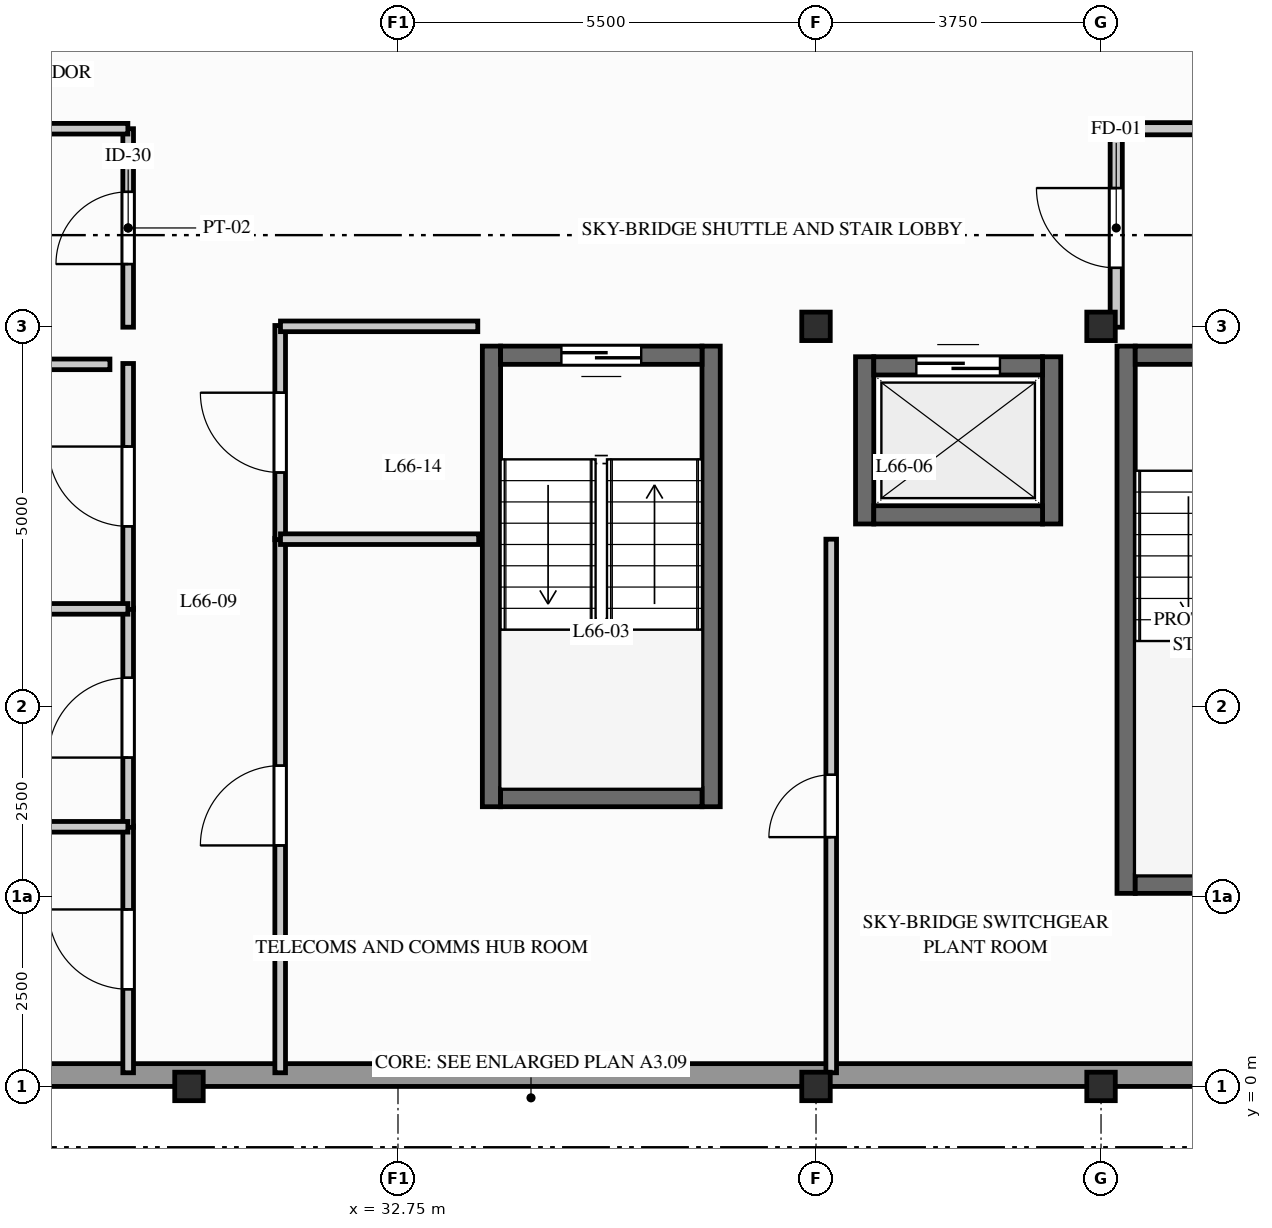
"""IFC4 building model, lengths in metres.
Left out: names, types, materials, properties, quantities, classifications, styles, units other than length and angle.
Written with IfcOpenShell. Run it as: python <this file> out.ifc"""

import sys

from ifc_helpers import new_model, si_unit, direction, frame, frame_2d, origin, origin_2d, place, context, subcontext, project, spatial, rectangle, i_section, extrude, element, fill, save


model = new_model("IFC4")
c1 = context("Model", 3, precision=1e-05, world=origin(), true_north=direction((0.0, 1.0)))
c2 = subcontext(c1, "Body", "Model", "MODEL_VIEW")
j1 = project(units=[si_unit("LENGTHUNIT", "METRE"), si_unit("PLANEANGLEUNIT", "RADIAN")], contexts=[c1])
p1 = place(None, origin())
s1 = spatial("IfcSite", under=j1, at=p1, CompositionType="ELEMENT")
p2 = place(p1, origin())
s2 = spatial("IfcBuilding", under=s1, at=p2, CompositionType="ELEMENT")
p3 = place(p2, frame((0.0, 0.0, 218.0)))
s3 = spatial("IfcBuildingStorey", under=s2, at=p3, CompositionType="ELEMENT", Elevation=218.0)
for number, where, z_axis, x_axis in (
    (1, (30.0, 0.0, 0.0), (0.0, 0.0, 1.0), (1.0, 0.0, 0.0)),
    (2, (38.25, 0.0, 0.0), (0.0, 0.0, 1.0), (1.0, 0.0, 0.0)),
    (3, (38.25, 10.0, 0.0), (0.0, 0.0, 1.0), (1.0, 0.0, 0.0)),
    (4, (42.0, 0.0, 0.0), (0.0, 0.0, 1.0), (1.0, 0.0, 0.0)),
    (5, (42.0, 10.0, 0.0), (0.0, 0.0, 1.0), (1.0, 0.0, 0.0)),
):
    element("IfcColumn", number, at=place(p3, frame(where, z_axis=z_axis, x_axis=x_axis)), inside=s3, PredefinedType="COLUMN", context=c2, shape_type="SweptSolid", body=[
        extrude(i_section(OverallWidth=0.375, OverallDepth=0.375, WebThickness=0.017, FlangeThickness=0.027, FilletRadius=0.015, at=origin_2d()), origin(), (0.0, 0.0, 1.0), 3.1),
    ])
p4 = place(p3, frame((2.5, 0.15, 0.0), z_axis=(0.0, 0.0, 1.0), x_axis=(1.0, 0.0, 0.0)))
e6 = element("IfcWall", 6, at=p4, inside=s3, PredefinedType="STANDARD", context=c2, shape_type="SweptSolid", body=[
    extrude(rectangle(XDim=55.0, YDim=0.3, at=frame_2d((27.5, 0.0))), origin(), (0.0, 0.0, 1.0), 2.332),
])
p5 = place(p4, frame((1.0, 0.0, 0.312)))
e7 = element("IfcOpeningElement", 7, at=p5, cuts=e6, PredefinedType="OPENING", context=c2, shape_type="SweptSolid", body=[
    extrude(rectangle(XDim=1.5, YDim=1.8, at=frame_2d((0.75, 0.9))), frame((0.0, 0.16, 0.0), z_axis=(0.0, -1.0, 0.0), x_axis=(1.0, 0.0, 0.0)), (0.0, 0.0, 1.0), 0.32),
])
p6 = place(p4, frame((24.5, 0.0, 1.15)))
e8 = element("IfcOpeningElement", 8, at=p6, cuts=e6, PredefinedType="OPENING", context=c2, shape_type="SweptSolid", body=[
    extrude(rectangle(XDim=0.9, YDim=0.9, at=frame_2d((0.45, 0.45))), frame((0.0, 0.16, 0.0), z_axis=(0.0, -1.0, 0.0), x_axis=(1.0, 0.0, 0.0)), (0.0, 0.0, 1.0), 0.32),
])
p7 = place(p4, frame((47.2, 0.0, 0.512)))
e9 = element("IfcOpeningElement", 9, at=p7, cuts=e6, PredefinedType="OPENING", context=c2, shape_type="SweptSolid", body=[
    extrude(rectangle(XDim=1.2, YDim=1.6, at=frame_2d((0.6, 0.8))), frame((0.0, 0.16, 0.0), z_axis=(0.0, -1.0, 0.0), x_axis=(1.0, 0.0, 0.0)), (0.0, 0.0, 1.0), 0.32),
])
p8 = place(p4, frame((52.3, 0.0, 0.512)))
e10 = element("IfcOpeningElement", 10, at=p8, cuts=e6, PredefinedType="OPENING", context=c2, shape_type="SweptSolid", body=[
    extrude(rectangle(XDim=1.2, YDim=1.6, at=frame_2d((0.6, 0.8))), frame((0.0, 0.16, 0.0), z_axis=(0.0, -1.0, 0.0), x_axis=(1.0, 0.0, 0.0)), (0.0, 0.0, 1.0), 0.32),
])
p9 = place(p3, frame((42.33, 2.54, 0.0), z_axis=(0.0, 0.0, 1.0), x_axis=(0.0, 1.0, 0.0)))
e11 = element("IfcWall", 11, at=p9, inside=s3, PredefinedType="SHEAR", context=c2, shape_type="SweptSolid", body=[
    extrude(rectangle(XDim=7.2, YDim=0.24, at=frame_2d((3.6, 0.0))), origin(), (0.0, 0.0, 1.0), 2.89),
])
p10 = place(p3, frame((42.45, 2.66, 0.0), z_axis=(0.0, 0.0, 1.0), x_axis=(1.0, 0.0, 0.0)))
e12 = element("IfcWall", 12, at=p10, inside=s3, PredefinedType="SHEAR", context=c2, shape_type="SweptSolid", body=[
    extrude(rectangle(XDim=2.95, YDim=0.24, at=frame_2d((1.475, 0.0))), origin(), (0.0, 0.0, 1.0), 2.89),
])
p11 = place(p3, frame((45.4, 9.62, 0.0), z_axis=(0.0, 0.0, 1.0), x_axis=(-1.0, 0.0, 0.0)))
e13 = element("IfcWall", 13, at=p11, inside=s3, PredefinedType="SHEAR", context=c2, shape_type="SweptSolid", body=[
    extrude(rectangle(XDim=2.95, YDim=0.24, at=frame_2d((1.475, 0.0))), origin(), (0.0, 0.0, 1.0), 2.89),
])
p12 = place(p11, frame((0.95, 0.0, 0.0)))
e14 = element("IfcOpeningElement", 14, at=p12, cuts=e13, PredefinedType="OPENING", context=c2, shape_type="SweptSolid", body=[
    extrude(rectangle(XDim=1.05, YDim=2.06, at=frame_2d((0.525, 1.03))), frame((0.0, 0.13, 0.0), z_axis=(0.0, -1.0, 0.0), x_axis=(1.0, 0.0, 0.0)), (0.0, 0.0, 1.0), 0.26),
])
for number, where, z_axis, x_axis in (
    (15, (33.98, 3.68, 0.0), (0.0, 0.0, 1.0), (0.0, 1.0, 0.0)),
    (16, (36.87, 3.68, 0.0), (0.0, 0.0, 1.0), (0.0, 1.0, 0.0)),
):
    element("IfcWall", number, at=place(p3, frame(where, z_axis=z_axis, x_axis=x_axis)), inside=s3, PredefinedType="SHEAR", context=c2, shape_type="SweptSolid", body=[
        extrude(rectangle(XDim=6.06, YDim=0.24, at=frame_2d((3.03, 0.0))), origin(), (0.0, 0.0, 1.0), 2.89),
    ])
p13 = place(p3, frame((34.1, 3.8, 0.0), z_axis=(0.0, 0.0, 1.0), x_axis=(1.0, 0.0, 0.0)))
e17 = element("IfcWall", 17, at=p13, inside=s3, PredefinedType="SHEAR", context=c2, shape_type="SweptSolid", body=[
    extrude(rectangle(XDim=2.65, YDim=0.24, at=frame_2d((1.325, 0.0))), origin(), (0.0, 0.0, 1.0), 2.89),
])
p14 = place(p3, frame((36.75, 9.62, 0.0), z_axis=(0.0, 0.0, 1.0), x_axis=(-1.0, 0.0, 0.0)))
e18 = element("IfcWall", 18, at=p14, inside=s3, PredefinedType="SHEAR", context=c2, shape_type="SweptSolid", body=[
    extrude(rectangle(XDim=2.65, YDim=0.24, at=frame_2d((1.325, 0.0))), origin(), (0.0, 0.0, 1.0), 2.89),
])
p15 = place(p14, frame((0.8, 0.0, 0.0)))
e19 = element("IfcOpeningElement", 19, at=p15, cuts=e18, PredefinedType="OPENING", context=c2, shape_type="SweptSolid", body=[
    extrude(rectangle(XDim=1.05, YDim=2.06, at=frame_2d((0.525, 1.03))), frame((0.0, 0.13, 0.0), z_axis=(0.0, -1.0, 0.0), x_axis=(1.0, 0.0, 0.0)), (0.0, 0.0, 1.0), 0.26),
])
for number, where, z_axis, x_axis in (
    (20, (38.89, 7.4, 0.0), (0.0, 0.0, 1.0), (0.0, 1.0, 0.0)),
    (21, (41.35, 7.4, 0.0), (0.0, 0.0, 1.0), (0.0, 1.0, 0.0)),
):
    element("IfcWall", number, at=place(p3, frame(where, z_axis=z_axis, x_axis=x_axis)), inside=s3, PredefinedType="SHEAR", context=c2, shape_type="SweptSolid", body=[
        extrude(rectangle(XDim=2.2, YDim=0.24, at=frame_2d((1.1, 0.0))), origin(), (0.0, 0.0, 1.0), 2.89),
    ])
p16 = place(p3, frame((39.01, 7.52, 0.0), z_axis=(0.0, 0.0, 1.0), x_axis=(1.0, 0.0, 0.0)))
e22 = element("IfcWall", 22, at=p16, inside=s3, PredefinedType="SHEAR", context=c2, shape_type="SweptSolid", body=[
    extrude(rectangle(XDim=2.22, YDim=0.24, at=frame_2d((1.11, 0.0))), origin(), (0.0, 0.0, 1.0), 2.89),
])
p17 = place(p3, frame((39.01, 9.48, 0.0), z_axis=(0.0, 0.0, 1.0), x_axis=(1.0, 0.0, 0.0)))
e23 = element("IfcWall", 23, at=p17, inside=s3, PredefinedType="SHEAR", context=c2, shape_type="SweptSolid", body=[
    extrude(rectangle(XDim=2.22, YDim=0.24, at=frame_2d((1.11, 0.0))), origin(), (0.0, 0.0, 1.0), 2.89),
])
p18 = place(p17, frame((0.56, 0.0, 0.0)))
e24 = element("IfcOpeningElement", 24, at=p18, cuts=e23, PredefinedType="OPENING", context=c2, shape_type="SweptSolid", body=[
    extrude(rectangle(XDim=1.1, YDim=2.06, at=frame_2d((0.55, 1.03))), frame((0.0, 0.13, 0.0), z_axis=(0.0, -1.0, 0.0), x_axis=(1.0, 0.0, 0.0)), (0.0, 0.0, 1.0), 0.26),
])
p19 = place(p3, frame((29.2, 0.18, 0.0), z_axis=(0.0, 0.0, 1.0), x_axis=(0.0, 1.0, 0.0)))
e25 = element("IfcWall", 25, at=p19, inside=s3, PredefinedType="PARTITIONING", context=c2, shape_type="SweptSolid", body=[
    extrude(rectangle(XDim=3.247, YDim=0.14, at=frame_2d((1.624, 0.0))), origin(), (0.0, 0.0, 1.0), 2.89),
])
p20 = place(p19, frame((1.099, 0.0, 0.0)))
e26 = element("IfcOpeningElement", 26, at=p20, cuts=e25, PredefinedType="OPENING", context=c2, shape_type="SweptSolid", body=[
    extrude(rectangle(XDim=1.05, YDim=2.06, at=frame_2d((0.525, 1.03))), frame((0.0, 0.08, 0.0), z_axis=(0.0, -1.0, 0.0), x_axis=(1.0, 0.0, 0.0)), (0.0, 0.0, 1.0), 0.16),
])
p21 = place(p3, frame((29.2, 3.409, 0.0), z_axis=(0.0, 0.0, 1.0), x_axis=(0.0, 1.0, 0.0)))
e27 = element("IfcWall", 27, at=p21, inside=s3, PredefinedType="PARTITIONING", context=c2, shape_type="SweptSolid", body=[
    extrude(rectangle(XDim=2.885, YDim=0.14, at=frame_2d((1.443, 0.0))), origin(), (0.0, 0.0, 1.0), 2.89),
])
p22 = place(p21, frame((0.918, 0.0, 0.0)))
e28 = element("IfcOpeningElement", 28, at=p22, cuts=e27, PredefinedType="OPENING", context=c2, shape_type="SweptSolid", body=[
    extrude(rectangle(XDim=1.05, YDim=2.06, at=frame_2d((0.525, 1.03))), frame((0.0, 0.08, 0.0), z_axis=(0.0, -1.0, 0.0), x_axis=(1.0, 0.0, 0.0)), (0.0, 0.0, 1.0), 0.16),
])
p23 = place(p3, frame((29.2, 6.276, 0.0), z_axis=(0.0, 0.0, 1.0), x_axis=(0.0, 1.0, 0.0)))
e29 = element("IfcWall", 29, at=p23, inside=s3, PredefinedType="PARTITIONING", context=c2, shape_type="SweptSolid", body=[
    extrude(rectangle(XDim=3.236, YDim=0.14, at=frame_2d((1.618, 0.0))), origin(), (0.0, 0.0, 1.0), 2.89),
])
p24 = place(p23, frame((1.093, 0.0, 0.0)))
e30 = element("IfcOpeningElement", 30, at=p24, cuts=e29, PredefinedType="OPENING", context=c2, shape_type="SweptSolid", body=[
    extrude(rectangle(XDim=1.05, YDim=2.06, at=frame_2d((0.525, 1.03))), frame((0.0, 0.08, 0.0), z_axis=(0.0, -1.0, 0.0), x_axis=(1.0, 0.0, 0.0)), (0.0, 0.0, 1.0), 0.16),
])
p25 = place(p3, frame((31.2, 0.18, 0.0), z_axis=(0.0, 0.0, 1.0), x_axis=(0.0, 1.0, 0.0)))
e31 = element("IfcWall", 31, at=p25, inside=s3, PredefinedType="PARTITIONING", context=c2, shape_type="SweptSolid", body=[
    extrude(rectangle(XDim=7.031, YDim=0.14, at=frame_2d((3.516, 0.0))), origin(), (0.0, 0.0, 1.0), 2.89),
])
p26 = place(p25, frame((2.991, 0.0, 0.0)))
e32 = element("IfcOpeningElement", 32, at=p26, cuts=e31, PredefinedType="OPENING", context=c2, shape_type="SweptSolid", body=[
    extrude(rectangle(XDim=1.05, YDim=2.06, at=frame_2d((0.525, 1.03))), frame((0.0, 0.08, 0.0), z_axis=(0.0, -1.0, 0.0), x_axis=(1.0, 0.0, 0.0)), (0.0, 0.0, 1.0), 0.16),
])
p27 = place(p3, frame((31.2, 7.193, 0.0), z_axis=(0.0, 0.0, 1.0), x_axis=(0.0, 1.0, 0.0)))
e33 = element("IfcWall", 33, at=p27, inside=s3, PredefinedType="PARTITIONING", context=c2, shape_type="SweptSolid", body=[
    extrude(rectangle(XDim=2.819, YDim=0.14, at=frame_2d((1.409, 0.0))), origin(), (0.0, 0.0, 1.0), 2.325),
])
p28 = place(p27, frame((0.884, 0.0, 0.0)))
e34 = element("IfcOpeningElement", 34, at=p28, cuts=e33, PredefinedType="OPENING", context=c2, shape_type="SweptSolid", body=[
    extrude(rectangle(XDim=1.05, YDim=2.06, at=frame_2d((0.525, 1.03))), frame((0.0, 0.08, 0.0), z_axis=(0.0, -1.0, 0.0), x_axis=(1.0, 0.0, 0.0)), (0.0, 0.0, 1.0), 0.16),
])
p29 = place(p3, frame((29.2, 9.989, 0.0), z_axis=(0.0, 0.0, 1.0), x_axis=(0.0, 1.0, 0.0)))
e35 = element("IfcWall", 35, at=p29, inside=s3, PredefinedType="PARTITIONING", context=c2, shape_type="SweptSolid", body=[
    extrude(rectangle(XDim=2.611, YDim=0.14, at=frame_2d((1.306, 0.0))), origin(), (0.0, 0.0, 1.0), 2.325),
])
p30 = place(p29, frame((0.831, 0.0, 0.0)))
e36 = element("IfcOpeningElement", 36, at=p30, cuts=e35, PredefinedType="OPENING", context=c2, shape_type="SweptSolid", body=[
    extrude(rectangle(XDim=0.95, YDim=2.05, at=frame_2d((0.475, 1.025))), frame((0.0, 0.08, 0.0), z_axis=(0.0, -1.0, 0.0), x_axis=(1.0, 0.0, 0.0)), (0.0, 0.0, 1.0), 0.16),
])
for number, where, z_axis, x_axis in (
    (37, (21.95, 3.416, 0.0), (0.0, 0.0, 1.0), (1.0, 0.0, 0.0)),
    (38, (21.95, 6.283, 0.0), (0.0, 0.0, 1.0), (1.0, 0.0, 0.0)),
):
    element("IfcWall", number, at=place(p3, frame(where, z_axis=z_axis, x_axis=x_axis)), inside=s3, PredefinedType="PARTITIONING", context=c2, shape_type="SweptSolid", body=[
        extrude(rectangle(XDim=7.246, YDim=0.14, at=frame_2d((3.623, 0.0))), origin(), (0.0, 0.0, 1.0), 2.89),
    ])
p31 = place(p3, frame((31.204, 7.2, 0.0), z_axis=(0.0, 0.0, 1.0), x_axis=(1.0, 0.0, 0.0)))
e39 = element("IfcWall", 39, at=p31, inside=s3, PredefinedType="PARTITIONING", context=c2, shape_type="SweptSolid", body=[
    extrude(rectangle(XDim=2.607, YDim=0.14, at=frame_2d((1.304, 0.0))), origin(), (0.0, 0.0, 1.0), 2.89),
])
p32 = place(p3, frame((38.45, 0.18, 0.0), z_axis=(0.0, 0.0, 1.0), x_axis=(0.0, 1.0, 0.0)))
e40 = element("IfcWall", 40, at=p32, inside=s3, PredefinedType="PARTITIONING", context=c2, shape_type="SweptSolid", body=[
    extrude(rectangle(XDim=7.02, YDim=0.14, at=frame_2d((3.51, 0.0))), origin(), (0.0, 0.0, 1.0), 2.325),
])
p33 = place(p32, frame((3.1, 0.0, 0.0)))
e41 = element("IfcOpeningElement", 41, at=p33, cuts=e40, PredefinedType="OPENING", context=c2, shape_type="SweptSolid", body=[
    extrude(rectangle(XDim=0.82, YDim=2.02, at=frame_2d((0.41, 1.01))), frame((0.0, 0.08, 0.0), z_axis=(0.0, -1.0, 0.0), x_axis=(1.0, 0.0, 0.0)), (0.0, 0.0, 1.0), 0.16),
])
p34 = place(p3, frame((31.204, 10.0, 0.0), z_axis=(0.0, 0.0, 1.0), x_axis=(1.0, 0.0, 0.0)))
e42 = element("IfcWall", 42, at=p34, inside=s3, PredefinedType="PARTITIONING", context=c2, shape_type="SweptSolid", body=[
    extrude(rectangle(XDim=2.596, YDim=0.14, at=frame_2d((1.298, 0.0))), origin(), (0.0, 0.0, 1.0), 2.325),
])
p35 = place(p3, frame((42.2, 9.989, 0.0), z_axis=(0.0, 0.0, 1.0), x_axis=(0.0, 1.0, 0.0)))
e43 = element("IfcWall", 43, at=p35, inside=s3, PredefinedType="PARTITIONING", context=c2, shape_type="SweptSolid", body=[
    extrude(rectangle(XDim=2.611, YDim=0.16, at=frame_2d((1.306, 0.0))), origin(), (0.0, 0.0, 1.0), 2.325),
])
p36 = place(p35, frame((0.781, 0.0, 0.0)))
e44 = element("IfcOpeningElement", 44, at=p36, cuts=e43, PredefinedType="OPENING", context=c2, shape_type="SweptSolid", body=[
    extrude(rectangle(XDim=1.05, YDim=2.06, at=frame_2d((0.525, 1.03))), frame((0.0, 0.09, 0.0), z_axis=(0.0, -1.0, 0.0), x_axis=(1.0, 0.0, 0.0)), (0.0, 0.0, 1.0), 0.18),
])
p37 = place(p3, frame((42.2, 12.6, 0.0), z_axis=(0.0, 0.0, 1.0), x_axis=(1.0, 0.0, 0.0)))
e45 = element("IfcWall", 45, at=p37, inside=s3, PredefinedType="PARTITIONING", context=c2, shape_type="SweptSolid", body=[
    extrude(rectangle(XDim=5.8, YDim=0.16, at=frame_2d((2.9, 0.0))), origin(), (0.0, 0.0, 1.0), 2.325),
])
p38 = place(p37, frame((2.375, 0.0, 0.0)))
e46 = element("IfcOpeningElement", 46, at=p38, cuts=e45, PredefinedType="OPENING", context=c2, shape_type="SweptSolid", body=[
    extrude(rectangle(XDim=1.05, YDim=2.06, at=frame_2d((0.525, 1.03))), frame((0.0, 0.09, 0.0), z_axis=(0.0, -1.0, 0.0), x_axis=(1.0, 0.0, 0.0)), (0.0, 0.0, 1.0), 0.18),
])
p39 = place(p3, frame((21.304, 12.6, 0.0), z_axis=(0.0, 0.0, 1.0), x_axis=(1.0, 0.0, 0.0)))
e47 = element("IfcWall", 47, at=p39, inside=s3, PredefinedType="PARTITIONING", context=c2, shape_type="SweptSolid", body=[
    extrude(rectangle(XDim=7.892, YDim=0.14, at=frame_2d((3.946, 0.0))), origin(), (0.0, 0.0, 1.0), 2.325),
])
p40 = place(p3, frame((21.95, 9.5, 0.0), z_axis=(0.0, 0.0, 1.0), x_axis=(1.0, 0.0, 0.0)))
e48 = element("IfcWall", 48, at=p40, inside=s3, PredefinedType="PARTITIONING", context=c2, shape_type="SweptSolid", body=[
    extrude(rectangle(XDim=7.01, YDim=0.14, at=frame_2d((3.505, 0.0))), origin(), (0.0, 0.0, 1.0), 2.89),
])
p41 = place(p15, origin())
e49 = element("IfcDoor", 49, at=p41, inside=s3, OperationType="SINGLE_SWING_LEFT", PredefinedType="DOOR", context=c2, shape_type="SweptSolid", body=[
    extrude(rectangle(XDim=1.05, YDim=2.06, at=frame_2d((0.525, 1.03))), frame((0.0, 0.025, 0.0), z_axis=(0.0, -1.0, 0.0), x_axis=(1.0, 0.0, 0.0)), (0.0, 0.0, 1.0), 0.05),
])
fill(e19, e49)
p42 = place(p18, origin())
e50 = element("IfcDoor", 50, at=p42, inside=s3, OperationType="SLIDING_TO_RIGHT", PredefinedType="DOOR", context=c2, shape_type="SweptSolid", body=[
    extrude(rectangle(XDim=1.1, YDim=2.06, at=frame_2d((0.55, 1.03))), frame((0.0, 0.025, 0.0), z_axis=(0.0, -1.0, 0.0), x_axis=(1.0, 0.0, 0.0)), (0.0, 0.0, 1.0), 0.05),
])
fill(e24, e50)
p43 = place(p20, origin())
e51 = element("IfcDoor", 51, at=p43, inside=s3, OperationType="SINGLE_SWING_RIGHT", PredefinedType="DOOR", context=c2, shape_type="SweptSolid", body=[
    extrude(rectangle(XDim=1.05, YDim=2.06, at=frame_2d((0.525, 1.03))), frame((0.0, 0.025, 0.0), z_axis=(0.0, -1.0, 0.0), x_axis=(1.0, 0.0, 0.0)), (0.0, 0.0, 1.0), 0.05),
])
fill(e26, e51)
p44 = place(p22, origin())
e52 = element("IfcDoor", 52, at=p44, inside=s3, OperationType="SINGLE_SWING_LEFT", PredefinedType="DOOR", context=c2, shape_type="SweptSolid", body=[
    extrude(rectangle(XDim=1.05, YDim=2.06, at=frame_2d((0.525, 1.03))), frame((0.0, 0.025, 0.0), z_axis=(0.0, -1.0, 0.0), x_axis=(1.0, 0.0, 0.0)), (0.0, 0.0, 1.0), 0.05),
])
fill(e28, e52)
p45 = place(p24, origin())
e53 = element("IfcDoor", 53, at=p45, inside=s3, OperationType="SINGLE_SWING_RIGHT", PredefinedType="DOOR", context=c2, shape_type="SweptSolid", body=[
    extrude(rectangle(XDim=1.05, YDim=2.06, at=frame_2d((0.525, 1.03))), frame((0.0, 0.025, 0.0), z_axis=(0.0, -1.0, 0.0), x_axis=(1.0, 0.0, 0.0)), (0.0, 0.0, 1.0), 0.05),
])
fill(e30, e53)
p46 = place(p26, origin())
e54 = element("IfcDoor", 54, at=p46, inside=s3, OperationType="SINGLE_SWING_LEFT", PredefinedType="DOOR", context=c2, shape_type="SweptSolid", body=[
    extrude(rectangle(XDim=1.05, YDim=2.06, at=frame_2d((0.525, 1.03))), frame((0.0, 0.025, 0.0), z_axis=(0.0, -1.0, 0.0), x_axis=(1.0, 0.0, 0.0)), (0.0, 0.0, 1.0), 0.05),
])
fill(e32, e54)
p47 = place(p28, origin())
e55 = element("IfcDoor", 55, at=p47, inside=s3, OperationType="SINGLE_SWING_RIGHT", PredefinedType="DOOR", context=c2, shape_type="SweptSolid", body=[
    extrude(rectangle(XDim=1.05, YDim=2.06, at=frame_2d((0.525, 1.03))), frame((0.0, 0.025, 0.0), z_axis=(0.0, -1.0, 0.0), x_axis=(1.0, 0.0, 0.0)), (0.0, 0.0, 1.0), 0.05),
])
fill(e34, e55)
p48 = place(p30, origin())
e56 = element("IfcDoor", 56, at=p48, inside=s3, OperationType="SINGLE_SWING_LEFT", PredefinedType="DOOR", context=c2, shape_type="SweptSolid", body=[
    extrude(rectangle(XDim=0.95, YDim=2.05, at=frame_2d((0.475, 1.025))), frame((0.0, 0.025, 0.0), z_axis=(0.0, -1.0, 0.0), x_axis=(1.0, 0.0, 0.0)), (0.0, 0.0, 1.0), 0.05),
])
fill(e36, e56)
p49 = place(p36, origin())
e57 = element("IfcDoor", 57, at=p49, inside=s3, OperationType="SINGLE_SWING_RIGHT", PredefinedType="DOOR", context=c2, shape_type="SweptSolid", body=[
    extrude(rectangle(XDim=1.05, YDim=2.06, at=frame_2d((0.525, 1.03))), frame((0.0, 0.025, 0.0), z_axis=(0.0, -1.0, 0.0), x_axis=(1.0, 0.0, 0.0)), (0.0, 0.0, 1.0), 0.05),
])
fill(e44, e57)
p50 = place(p33, origin())
e58 = element("IfcDoor", 58, at=p50, inside=s3, OperationType="SINGLE_SWING_LEFT", PredefinedType="DOOR", context=c2, shape_type="SweptSolid", body=[
    extrude(rectangle(XDim=0.82, YDim=2.02, at=frame_2d((0.41, 1.01))), frame((0.0, 0.025, 0.0), z_axis=(0.0, -1.0, 0.0), x_axis=(1.0, 0.0, 0.0)), (0.0, 0.0, 1.0), 0.05),
])
fill(e41, e58)
save(model, sys.argv[1])
